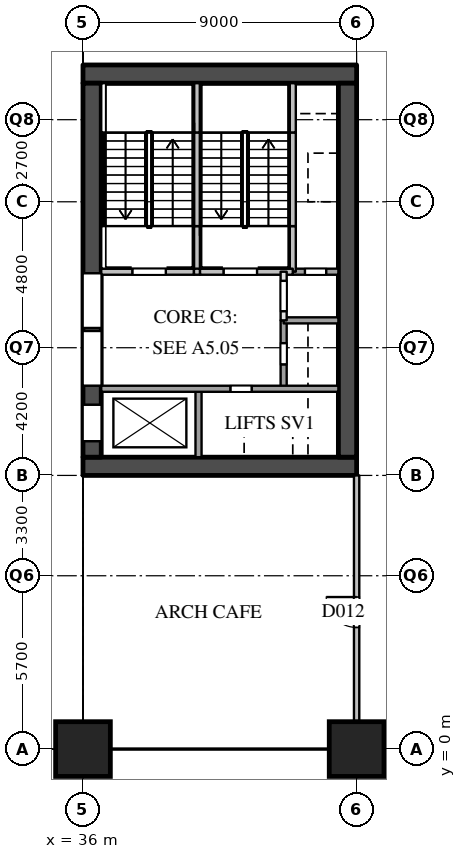
"""IFC4 building model, lengths in metres.
Left out: names, types, materials, properties, quantities, classifications, styles, units other than length and angle.
Written with IfcOpenShell. Run it as: python <this file> out.ifc"""

import sys

from ifc_helpers import new_model, si_unit, direction, frame, frame_2d, origin, origin_2d, place, context, subcontext, project, spatial, rectangle, extrude, element, fill, save


model = new_model("IFC4")
c1 = context("Model", 3, precision=1e-05, world=origin(), true_north=direction((0.0, 1.0)))
c2 = subcontext(c1, "Body", "Model", "MODEL_VIEW")
j1 = project(units=[si_unit("LENGTHUNIT", "METRE"), si_unit("PLANEANGLEUNIT", "RADIAN")], contexts=[c1])
p1 = place(None, origin())
s1 = spatial("IfcSite", under=j1, at=p1, CompositionType="ELEMENT")
p2 = place(p1, origin())
s2 = spatial("IfcBuilding", under=s1, at=p2, CompositionType="ELEMENT")
p3 = place(p2, origin())
s3 = spatial("IfcBuildingStorey", under=s2, at=p3, CompositionType="ELEMENT", Elevation=0.0)
for number, where, z_axis, x_axis in (
    (1, (36.0, 0.0, 0.0), (0.0, 0.0, 1.0), (1.0, 0.0, 0.0)),
    (2, (45.0, 0.0, 0.0), (0.0, 0.0, 1.0), (1.0, 0.0, 0.0)),
):
    element("IfcColumn", number, at=place(p3, frame(where, z_axis=z_axis, x_axis=x_axis)), inside=s3, PredefinedType="COLUMN", context=c2, shape_type="SweptSolid", body=[
        extrude(rectangle(XDim=1.8, YDim=1.8, at=origin_2d()), origin(), (0.0, 0.0, 1.0), 8.0),
    ])
for number, where, z_axis, x_axis in (
    (3, (36.0, 9.3, 0.0), (0.0, 0.0, 1.0), (1.0, 0.0, 0.0)),
    (4, (36.0, 22.2, 0.0), (0.0, 0.0, 1.0), (1.0, 0.0, 0.0)),
):
    element("IfcWall", number, at=place(p3, frame(where, z_axis=z_axis, x_axis=x_axis)), inside=s3, PredefinedType="SHEAR", context=c2, shape_type="SweptSolid", body=[
        extrude(rectangle(XDim=9.0, YDim=0.6, at=frame_2d((4.5, 0.0))), origin(), (0.0, 0.0, 1.0), 7.59),
    ])
p4 = place(p3, frame((36.3, 9.6, 0.0), z_axis=(0.0, 0.0, 1.0), x_axis=(0.0, 1.0, 0.0)))
e5 = element("IfcWall", 5, at=p4, inside=s3, PredefinedType="SHEAR", context=c2, shape_type="SweptSolid", body=[
    extrude(rectangle(XDim=12.3, YDim=0.6, at=frame_2d((6.15, 0.0))), origin(), (0.0, 0.0, 1.0), 7.59),
])
p5 = place(p4, frame((0.525, 0.0, 0.0)))
e6 = element("IfcOpeningElement", 6, at=p5, cuts=e5, PredefinedType="OPENING", context=c2, shape_type="SweptSolid", body=[
    extrude(rectangle(XDim=1.2, YDim=2.1, at=frame_2d((0.6, 1.05))), frame((0.0, 0.31, 0.0), z_axis=(0.0, -1.0, 0.0), x_axis=(1.0, 0.0, 0.0)), (0.0, 0.0, 1.0), 0.62),
])
p6 = place(p4, frame((2.35, 0.0, 0.0)))
e7 = element("IfcOpeningElement", 7, at=p6, cuts=e5, PredefinedType="OPENING", context=c2, shape_type="SweptSolid", body=[
    extrude(rectangle(XDim=1.8, YDim=2.4, at=frame_2d((0.9, 1.2))), frame((0.0, 0.31, 0.0), z_axis=(0.0, -1.0, 0.0), x_axis=(1.0, 0.0, 0.0)), (0.0, 0.0, 1.0), 0.62),
])
p7 = place(p4, frame((4.25, 0.0, 0.0)))
e8 = element("IfcOpeningElement", 8, at=p7, cuts=e5, PredefinedType="OPENING", context=c2, shape_type="SweptSolid", body=[
    extrude(rectangle(XDim=1.8, YDim=2.4, at=frame_2d((0.9, 1.2))), frame((0.0, 0.31, 0.0), z_axis=(0.0, -1.0, 0.0), x_axis=(1.0, 0.0, 0.0)), (0.0, 0.0, 1.0), 0.62),
])
p8 = place(p3, frame((44.7, 9.6, 0.0), z_axis=(0.0, 0.0, 1.0), x_axis=(0.0, 1.0, 0.0)))
e9 = element("IfcWall", 9, at=p8, inside=s3, PredefinedType="SHEAR", context=c2, shape_type="SweptSolid", body=[
    extrude(rectangle(XDim=12.3, YDim=0.6, at=frame_2d((6.15, 0.0))), origin(), (0.0, 0.0, 1.0), 7.59),
])
p9 = place(p3, frame((39.75, 15.7, 0.0), z_axis=(0.0, 0.0, 1.0), x_axis=(0.0, 1.0, 0.0)))
e10 = element("IfcWall", 10, at=p9, inside=s3, PredefinedType="SOLIDWALL", context=c2, shape_type="SweptSolid", body=[
    extrude(rectangle(XDim=1.5, YDim=0.2, at=frame_2d((0.75, 0.0))), origin(), (0.0, 0.0, 1.0), 7.59),
])
p10 = place(p3, frame((39.75, 17.2, 0.0), z_axis=(0.0, 0.0, 1.0), x_axis=(0.0, 1.0, 0.0)))
e11 = element("IfcWall", 11, at=p10, inside=s3, PredefinedType="SOLIDWALL", context=c2, shape_type="SweptSolid", body=[
    extrude(rectangle(XDim=3.08, YDim=0.2, at=frame_2d((1.54, 0.0))), origin(), (0.0, 0.0, 1.0), 7.59),
])
p11 = place(p3, frame((39.75, 20.28, 0.0), z_axis=(0.0, 0.0, 1.0), x_axis=(0.0, 1.0, 0.0)))
e12 = element("IfcWall", 12, at=p11, inside=s3, PredefinedType="SOLIDWALL", context=c2, shape_type="SweptSolid", body=[
    extrude(rectangle(XDim=1.62, YDim=0.2, at=frame_2d((0.81, 0.0))), origin(), (0.0, 0.0, 1.0), 7.59),
])
p12 = place(p3, frame((39.8, 9.6, 0.0), z_axis=(0.0, 0.0, 1.0), x_axis=(0.0, 1.0, 0.0)))
e13 = element("IfcWall", 13, at=p12, inside=s3, PredefinedType="SOLIDWALL", context=c2, shape_type="SweptSolid", body=[
    extrude(rectangle(XDim=2.3, YDim=0.2, at=frame_2d((1.15, 0.0))), origin(), (0.0, 0.0, 1.0), 7.59),
])
p13 = place(p3, frame((42.6, 14.1, 0.0), z_axis=(0.0, 0.0, 1.0), x_axis=(0.0, 1.0, 0.0)))
e14 = element("IfcWall", 14, at=p13, inside=s3, PredefinedType="PARTITIONING", context=c2, shape_type="SweptSolid", body=[
    extrude(rectangle(XDim=1.6, YDim=0.2, at=frame_2d((0.8, 0.0))), origin(), (0.0, 0.0, 1.0), 7.59),
])
p14 = place(p13, frame((0.3, 0.0, 0.0)))
e15 = element("IfcOpeningElement", 15, at=p14, cuts=e14, PredefinedType="OPENING", context=c2, shape_type="SweptSolid", body=[
    extrude(rectangle(XDim=1.0, YDim=2.1, at=frame_2d((0.5, 1.05))), frame((0.0, 0.11, 0.0), z_axis=(0.0, -1.0, 0.0), x_axis=(1.0, 0.0, 0.0)), (0.0, 0.0, 1.0), 0.22),
])
p15 = place(p3, frame((42.6, 11.9, 0.0), z_axis=(0.0, 0.0, 1.0), x_axis=(0.0, 1.0, 0.0)))
e16 = element("IfcWall", 16, at=p15, inside=s3, PredefinedType="SOLIDWALL", context=c2, shape_type="SweptSolid", body=[
    extrude(rectangle(XDim=2.2, YDim=0.2, at=frame_2d((1.1, 0.0))), origin(), (0.0, 0.0, 1.0), 7.59),
])
p16 = place(p15, frame((0.75, 0.0, 0.0)))
e17 = element("IfcOpeningElement", 17, at=p16, cuts=e16, PredefinedType="OPENING", context=c2, shape_type="SweptSolid", body=[
    extrude(rectangle(XDim=0.7, YDim=2.1, at=frame_2d((0.35, 1.05))), frame((0.0, 0.11, 0.0), z_axis=(0.0, -1.0, 0.0), x_axis=(1.0, 0.0, 0.0)), (0.0, 0.0, 1.0), 0.22),
])
p17 = place(p3, frame((42.9, 15.7, 0.0), z_axis=(0.0, 0.0, 1.0), x_axis=(0.0, 1.0, 0.0)))
e18 = element("IfcWall", 18, at=p17, inside=s3, PredefinedType="SOLIDWALL", context=c2, shape_type="SweptSolid", body=[
    extrude(rectangle(XDim=1.5, YDim=0.2, at=frame_2d((0.75, 0.0))), origin(), (0.0, 0.0, 1.0), 7.59),
])
p18 = place(p3, frame((42.9, 17.2, 0.0), z_axis=(0.0, 0.0, 1.0), x_axis=(0.0, 1.0, 0.0)))
e19 = element("IfcWall", 19, at=p18, inside=s3, PredefinedType="SOLIDWALL", context=c2, shape_type="SweptSolid", body=[
    extrude(rectangle(XDim=3.08, YDim=0.2, at=frame_2d((1.54, 0.0))), origin(), (0.0, 0.0, 1.0), 7.59),
])
p19 = place(p3, frame((42.9, 20.28, 0.0), z_axis=(0.0, 0.0, 1.0), x_axis=(0.0, 1.0, 0.0)))
e20 = element("IfcWall", 20, at=p19, inside=s3, PredefinedType="SOLIDWALL", context=c2, shape_type="SweptSolid", body=[
    extrude(rectangle(XDim=1.62, YDim=0.2, at=frame_2d((0.81, 0.0))), origin(), (0.0, 0.0, 1.0), 7.59),
])
p20 = place(p3, frame((36.6, 11.85, 0.0), z_axis=(0.0, 0.0, 1.0), x_axis=(1.0, 0.0, 0.0)))
e21 = element("IfcWall", 21, at=p20, inside=s3, PredefinedType="SOLIDWALL", context=c2, shape_type="SweptSolid", body=[
    extrude(rectangle(XDim=7.8, YDim=0.2, at=frame_2d((3.9, 0.0))), origin(), (0.0, 0.0, 1.0), 7.59),
])
p21 = place(p20, frame((4.25, 0.0, 0.0)))
e22 = element("IfcOpeningElement", 22, at=p21, cuts=e21, PredefinedType="OPENING", context=c2, shape_type="SweptSolid", body=[
    extrude(rectangle(XDim=0.7, YDim=2.1, at=frame_2d((0.35, 1.05))), frame((0.0, 0.11, 0.0), z_axis=(0.0, -1.0, 0.0), x_axis=(1.0, 0.0, 0.0)), (0.0, 0.0, 1.0), 0.22),
])
p22 = place(p3, frame((42.6, 14.1, 0.0), z_axis=(0.0, 0.0, 1.0), x_axis=(1.0, 0.0, 0.0)))
e23 = element("IfcWall", 23, at=p22, inside=s3, PredefinedType="SOLIDWALL", context=c2, shape_type="SweptSolid", body=[
    extrude(rectangle(XDim=1.8, YDim=0.2, at=frame_2d((0.9, 0.0))), origin(), (0.0, 0.0, 1.0), 7.59),
])
p23 = place(p3, frame((42.9, 15.7, 0.0), z_axis=(0.0, 0.0, 1.0), x_axis=(1.0, 0.0, 0.0)))
e24 = element("IfcWall", 24, at=p23, inside=s3, PredefinedType="SOLIDWALL", context=c2, shape_type="SweptSolid", body=[
    extrude(rectangle(XDim=1.5, YDim=0.2, at=frame_2d((0.75, 0.0))), origin(), (0.0, 0.0, 1.0), 7.59),
])
p24 = place(p23, frame((0.4, 0.0, 0.0)))
e25 = element("IfcOpeningElement", 25, at=p24, cuts=e24, PredefinedType="OPENING", context=c2, shape_type="SweptSolid", body=[
    extrude(rectangle(XDim=0.7, YDim=2.1, at=frame_2d((0.35, 1.05))), frame((0.0, 0.11, 0.0), z_axis=(0.0, -1.0, 0.0), x_axis=(1.0, 0.0, 0.0)), (0.0, 0.0, 1.0), 0.22),
])
p25 = place(p3, frame((36.6, 15.7, 0.0), z_axis=(0.0, 0.0, 1.0), x_axis=(1.0, 0.0, 0.0)))
e26 = element("IfcWall", 26, at=p25, inside=s3, PredefinedType="SOLIDWALL", context=c2, shape_type="SweptSolid", body=[
    extrude(rectangle(XDim=3.05, YDim=0.2, at=frame_2d((1.525, 0.0))), origin(), (0.0, 0.0, 1.0), 7.59),
])
p26 = place(p25, frame((1.025, 0.0, 0.0)))
e27 = element("IfcOpeningElement", 27, at=p26, cuts=e26, PredefinedType="OPENING", context=c2, shape_type="SweptSolid", body=[
    extrude(rectangle(XDim=1.1, YDim=2.1, at=frame_2d((0.55, 1.05))), frame((0.0, 0.11, 0.0), z_axis=(0.0, -1.0, 0.0), x_axis=(1.0, 0.0, 0.0)), (0.0, 0.0, 1.0), 0.22),
])
p27 = place(p3, frame((39.65, 15.7, 0.0), z_axis=(0.0, 0.0, 1.0), x_axis=(1.0, 0.0, 0.0)))
e28 = element("IfcWall", 28, at=p27, inside=s3, PredefinedType="SOLIDWALL", context=c2, shape_type="SweptSolid", body=[
    extrude(rectangle(XDim=0.2, YDim=0.2, at=frame_2d((0.1, 0.0))), origin(), (0.0, 0.0, 1.0), 7.59),
])
p28 = place(p3, frame((39.85, 15.7, 0.0), z_axis=(0.0, 0.0, 1.0), x_axis=(1.0, 0.0, 0.0)))
e29 = element("IfcWall", 29, at=p28, inside=s3, PredefinedType="SOLIDWALL", context=c2, shape_type="SweptSolid", body=[
    extrude(rectangle(XDim=3.05, YDim=0.2, at=frame_2d((1.525, 0.0))), origin(), (0.0, 0.0, 1.0), 7.59),
])
p29 = place(p28, frame((0.775, 0.0, 0.0)))
e30 = element("IfcOpeningElement", 30, at=p29, cuts=e29, PredefinedType="OPENING", context=c2, shape_type="SweptSolid", body=[
    extrude(rectangle(XDim=1.1, YDim=2.1, at=frame_2d((0.55, 1.05))), frame((0.0, 0.11, 0.0), z_axis=(0.0, -1.0, 0.0), x_axis=(1.0, 0.0, 0.0)), (0.0, 0.0, 1.0), 0.22),
])
p30 = place(p3, frame((45.0, 0.0, 0.0), z_axis=(0.0, 0.0, 1.0), x_axis=(0.0, 1.0, 0.0)))
e31 = element("IfcWall", 31, at=p30, inside=s3, PredefinedType="PARTITIONING", context=c2, shape_type="SweptSolid", body=[
    extrude(rectangle(XDim=9.0, YDim=0.175, at=frame_2d((4.5, 0.0))), origin(), (0.0, 0.0, 1.0), 7.59),
])
p31 = place(p30, frame((4.0, 0.0, 0.0)))
e32 = element("IfcOpeningElement", 32, at=p31, cuts=e31, PredefinedType="OPENING", context=c2, shape_type="SweptSolid", body=[
    extrude(rectangle(XDim=1.0, YDim=2.1, at=frame_2d((0.5, 1.05))), frame((0.0, 0.097, 0.0), z_axis=(0.0, -1.0, 0.0), x_axis=(1.0, 0.0, 0.0)), (0.0, 0.0, 1.0), 0.195),
])
p32 = place(p5, origin())
e33 = element("IfcDoor", 33, at=p32, inside=s3, OperationType="SLIDING_TO_LEFT", PredefinedType="DOOR", context=c2, shape_type="SweptSolid", body=[
    extrude(rectangle(XDim=1.2, YDim=2.1, at=frame_2d((0.6, 1.05))), frame((0.0, 0.025, 0.0), z_axis=(0.0, -1.0, 0.0), x_axis=(1.0, 0.0, 0.0)), (0.0, 0.0, 1.0), 0.05),
])
fill(e6, e33)
p33 = place(p26, origin())
e34 = element("IfcDoor", 34, at=p33, inside=s3, OperationType="SINGLE_SWING_RIGHT", PredefinedType="DOOR", context=c2, shape_type="SweptSolid", body=[
    extrude(rectangle(XDim=1.1, YDim=2.1, at=frame_2d((0.55, 1.05))), frame((0.0, 0.025, 0.0), z_axis=(0.0, -1.0, 0.0), x_axis=(1.0, 0.0, 0.0)), (0.0, 0.0, 1.0), 0.05),
])
fill(e27, e34)
p34 = place(p29, origin())
e35 = element("IfcDoor", 35, at=p34, inside=s3, OperationType="SINGLE_SWING_LEFT", PredefinedType="DOOR", context=c2, shape_type="SweptSolid", body=[
    extrude(rectangle(XDim=1.1, YDim=2.1, at=frame_2d((0.55, 1.05))), frame((0.0, 0.025, 0.0), z_axis=(0.0, -1.0, 0.0), x_axis=(1.0, 0.0, 0.0)), (0.0, 0.0, 1.0), 0.05),
])
fill(e30, e35)
p35 = place(p24, origin())
e36 = element("IfcDoor", 36, at=p35, inside=s3, OperationType="SINGLE_SWING_LEFT", PredefinedType="DOOR", context=c2, shape_type="SweptSolid", body=[
    extrude(rectangle(XDim=0.7, YDim=2.1, at=frame_2d((0.35, 1.05))), frame((0.0, 0.025, 0.0), z_axis=(0.0, -1.0, 0.0), x_axis=(1.0, 0.0, 0.0)), (0.0, 0.0, 1.0), 0.05),
])
fill(e25, e36)
p36 = place(p16, origin())
e37 = element("IfcDoor", 37, at=p36, inside=s3, OperationType="SINGLE_SWING_RIGHT", PredefinedType="DOOR", context=c2, shape_type="SweptSolid", body=[
    extrude(rectangle(XDim=0.7, YDim=2.1, at=frame_2d((0.35, 1.05))), frame((0.0, 0.025, 0.0), z_axis=(0.0, -1.0, 0.0), x_axis=(1.0, 0.0, 0.0)), (0.0, 0.0, 1.0), 0.05),
])
fill(e17, e37)
p37 = place(p21, origin())
e38 = element("IfcDoor", 38, at=p37, inside=s3, OperationType="SINGLE_SWING_RIGHT", PredefinedType="DOOR", context=c2, shape_type="SweptSolid", body=[
    extrude(rectangle(XDim=0.7, YDim=2.1, at=frame_2d((0.35, 1.05))), frame((0.0, 0.025, 0.0), z_axis=(0.0, -1.0, 0.0), x_axis=(1.0, 0.0, 0.0)), (0.0, 0.0, 1.0), 0.05),
])
fill(e22, e38)
p38 = place(p14, origin())
e39 = element("IfcDoor", 39, at=p38, inside=s3, OperationType="SINGLE_SWING_RIGHT", PredefinedType="DOOR", context=c2, shape_type="SweptSolid", body=[
    extrude(rectangle(XDim=1.0, YDim=2.1, at=frame_2d((0.5, 1.05))), frame((0.0, 0.025, 0.0), z_axis=(0.0, -1.0, 0.0), x_axis=(1.0, 0.0, 0.0)), (0.0, 0.0, 1.0), 0.05),
])
fill(e15, e39)
p39 = place(p6, origin())
e40 = element("IfcDoor", 40, at=p39, inside=s3, OperationType="DOUBLE_DOOR_SINGLE_SWING", PredefinedType="DOOR", context=c2, shape_type="SweptSolid", body=[
    extrude(rectangle(XDim=1.8, YDim=2.4, at=frame_2d((0.9, 1.2))), frame((0.0, 0.025, 0.0), z_axis=(0.0, -1.0, 0.0), x_axis=(1.0, 0.0, 0.0)), (0.0, 0.0, 1.0), 0.05),
])
fill(e7, e40)
p40 = place(p7, origin())
e41 = element("IfcDoor", 41, at=p40, inside=s3, OperationType="DOUBLE_DOOR_SINGLE_SWING", PredefinedType="DOOR", context=c2, shape_type="SweptSolid", body=[
    extrude(rectangle(XDim=1.8, YDim=2.4, at=frame_2d((0.9, 1.2))), frame((0.0, 0.025, 0.0), z_axis=(0.0, -1.0, 0.0), x_axis=(1.0, 0.0, 0.0)), (0.0, 0.0, 1.0), 0.05),
])
fill(e8, e41)
p41 = place(p31, origin())
e42 = element("IfcDoor", 42, at=p41, inside=s3, OperationType="SINGLE_SWING_RIGHT", PredefinedType="DOOR", context=c2, shape_type="SweptSolid", body=[
    extrude(rectangle(XDim=1.0, YDim=2.1, at=frame_2d((0.5, 1.05))), frame((0.0, 0.025, 0.0), z_axis=(0.0, -1.0, 0.0), x_axis=(1.0, 0.0, 0.0)), (0.0, 0.0, 1.0), 0.05),
])
fill(e32, e42)
save(model, sys.argv[1])
